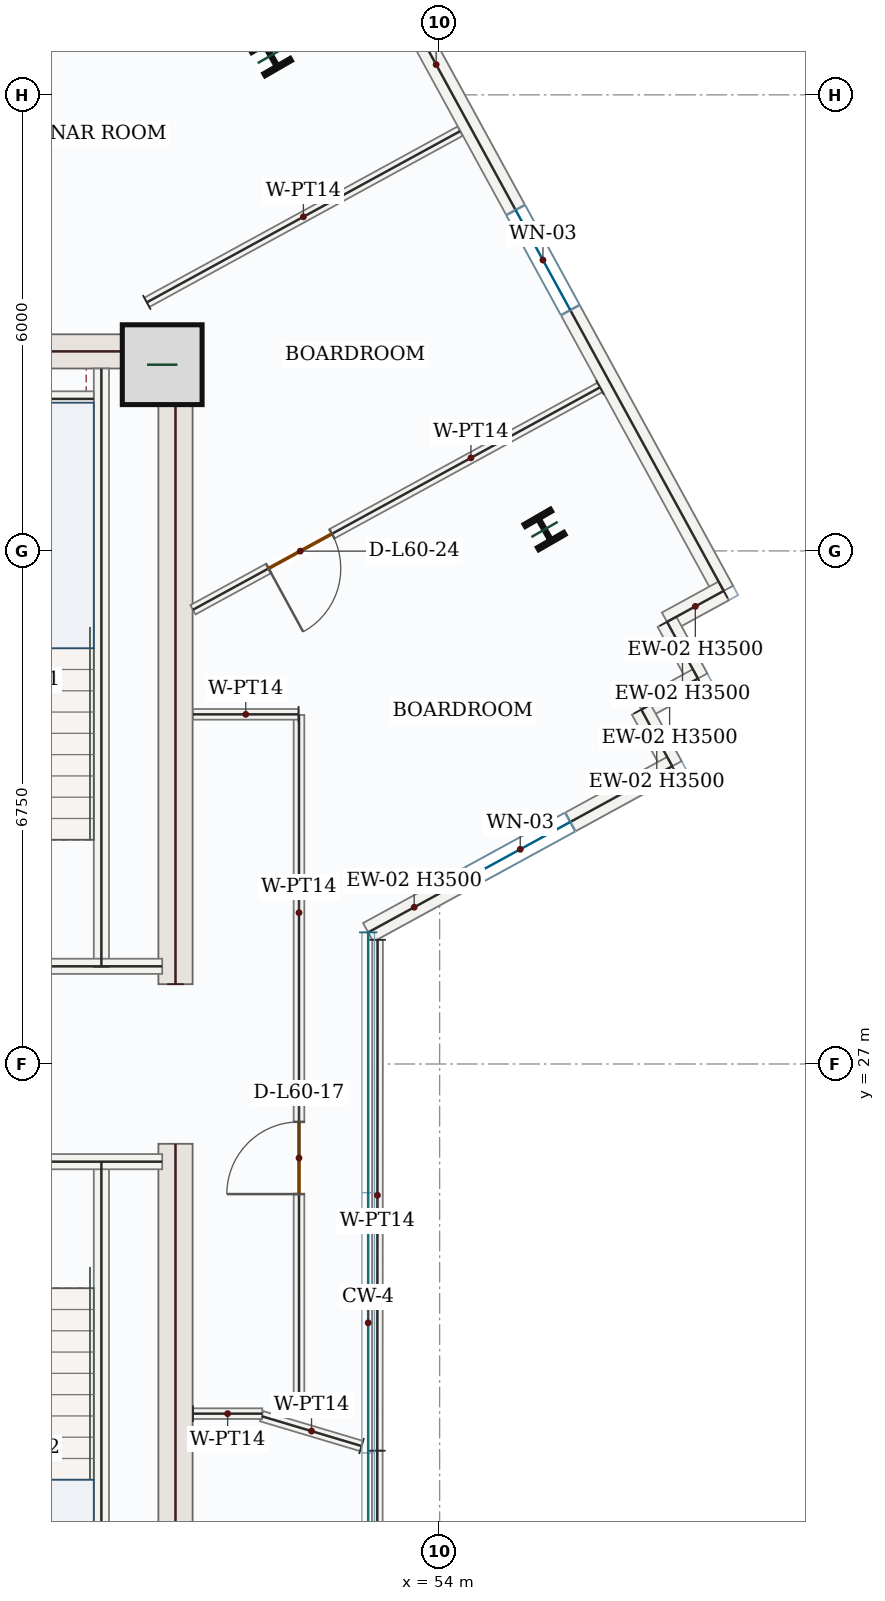
"""IFC4 building model, lengths in metres.
Left out: names, types, materials, properties, quantities, classifications, styles, units other than length and angle.
Written with IfcOpenShell. Run it as: python <this file> out.ifc"""

import sys

from ifc_helpers import new_model, si_unit, direction, frame, frame_2d, origin, origin_2d, place, context, subcontext, project, spatial, rectangle, i_section, extrude, source, transform, mapped, element, fill, save


model = new_model("IFC4")
c1 = context("Model", 3, precision=1e-05, world=origin(), true_north=direction((0.0, 1.0)))
c2 = subcontext(c1, "Body", "Model", "MODEL_VIEW")
j1 = project(units=[si_unit("LENGTHUNIT", "METRE"), si_unit("PLANEANGLEUNIT", "RADIAN")], contexts=[c1])
p1 = place(None, origin())
s1 = spatial("IfcSite", under=j1, at=p1, CompositionType="ELEMENT")
p2 = place(p1, origin())
s2 = spatial("IfcBuilding", under=s1, at=p2, CompositionType="ELEMENT")
p3 = place(p2, frame((0.0, 0.0, 254.1)))
s3 = spatial("IfcBuildingStorey", under=s2, at=p3, CompositionType="ELEMENT", Elevation=254.1)
m1 = source(origin(), c2, "Body", "SweptSolid", [
    extrude(rectangle(XDim=8.55, YDim=0.45, at=frame_2d((4.275, 0.0))), origin(), (0.0, 0.0, 1.0), 3.5),
])
for number, where, z_axis, x_axis in (
    (1, (50.525, 17.4, 0.0), (0.0, 0.0, 1.0), (0.0, 1.0, 0.0)),
    (2, (50.525, 28.05, 0.0), (0.0, 0.0, 1.0), (0.0, 1.0, 0.0)),
):
    element("IfcWall", number, at=place(p3, frame(where, z_axis=z_axis, x_axis=x_axis)), inside=s3, PredefinedType="SHEAR", context=c2, shape_type="MappedRepresentation", body=[
        mapped(m1, transform((0.0, 0.0, 0.0), x_axis=(1.0, 0.0, 0.0), y_axis=(0.0, 1.0, 0.0), z_axis=(0.0, 0.0, 1.0), scale=1.0)),
    ])
m2 = source(origin(), c2, "Body", "SweptSolid", [
    extrude(rectangle(XDim=7.1, YDim=0.45, at=frame_2d((3.55, 0.0))), origin(), (0.0, 0.0, 1.0), 3.5),
])
p4 = place(p3, frame((43.2, 36.375, 0.0), z_axis=(0.0, 0.0, 1.0), x_axis=(1.0, 0.0, 0.0)))
e3 = element("IfcWall", 3, at=p4, inside=s3, PredefinedType="SHEAR", context=c2, shape_type="MappedRepresentation", body=[
    mapped(m2, transform((0.0, 0.0, 0.0), x_axis=(1.0, 0.0, 0.0), y_axis=(0.0, 1.0, 0.0), z_axis=(0.0, 0.0, 1.0), scale=1.0)),
])
m3 = source(origin(), c2, "Body", "SweptSolid", [
    extrude(rectangle(XDim=1.05, YDim=1.05, at=origin_2d()), origin(), (0.0, 0.0, 1.0), 3.75),
])
p5 = place(p3, frame((50.35, 36.2, 0.0), z_axis=(0.0, 0.0, 1.0), x_axis=(1.0, 0.0, 0.0)))
e4 = element("IfcColumn", 4, at=p5, inside=s3, PredefinedType="COLUMN", context=c2, shape_type="MappedRepresentation", body=[
    mapped(m3, transform((0.0, 0.0, 0.0), x_axis=(1.0, 0.0, 0.0), y_axis=(0.0, 1.0, 0.0), z_axis=(0.0, 0.0, 1.0), scale=1.0)),
])
m4 = source(origin(), c2, "Body", "SweptSolid", [
    extrude(i_section(OverallWidth=0.399, OverallDepth=0.386, WebThickness=0.021, FlangeThickness=0.033, FilletRadius=0.018, at=origin_2d()), origin(), (0.0, 0.0, 1.0), 3.75),
])
for number, where, z_axis, x_axis in (
    (5, (55.38, 34.032, 0.0), (0.0, 0.0, 1.0), (0.866, 0.5, 0.0)),
    (6, (51.78, 40.268, 0.0), (0.0, 0.0, 1.0), (0.866, 0.5, 0.0)),
):
    element("IfcColumn", number, at=place(p3, frame(where, z_axis=z_axis, x_axis=x_axis)), inside=s3, PredefinedType="COLUMN", context=c2, shape_type="MappedRepresentation", body=[
        mapped(m4, transform((0.0, 0.0, 0.0), x_axis=(1.0, 0.0, 0.0), y_axis=(0.0, 1.0, 0.0), z_axis=(0.0, 0.0, 1.0), scale=1.0)),
    ])
p6 = place(p3, frame((44.549, 39.26, 0.0), z_axis=(0.0, 0.0, 1.0), x_axis=(0.877569176667, 0.479450039279, 0.0)))
e7 = element("IfcWall", 7, at=p6, inside=s3, PredefinedType="SOLIDWALL", context=c2, shape_type="SweptSolid", body=[
    extrude(rectangle(XDim=6.979, YDim=0.28, at=frame_2d((3.49, 0.0))), origin(), (0.0, 0.0, 1.0), 3.5),
])
p7 = place(p6, frame((2.74, 0.0, 0.85)))
e8 = element("IfcOpeningElement", 8, at=p7, cuts=e7, PredefinedType="OPENING", context=c2, shape_type="SweptSolid", body=[
    extrude(rectangle(XDim=1.5, YDim=1.5, at=frame_2d((0.75, 0.75))), frame((0.0, 0.15, 0.0), z_axis=(0.0, -1.0, 0.0), x_axis=(1.0, 0.0, 0.0)), (0.0, 0.0, 1.0), 0.3),
])
p8 = place(p3, frame((52.981, 41.929, 0.0), z_axis=(0.0, 0.0, 1.0), x_axis=(0.479472774144, -0.877556755347, 0.0)))
e9 = element("IfcWall", 9, at=p8, inside=s3, PredefinedType="SOLIDWALL", context=c2, shape_type="SweptSolid", body=[
    extrude(rectangle(XDim=9.92, YDim=0.28, at=frame_2d((4.96, 0.0))), origin(), (0.0, 0.0, 1.0), 3.5),
])
p9 = place(p8, frame((4.21, 0.0, 0.85)))
e10 = element("IfcOpeningElement", 10, at=p9, cuts=e9, PredefinedType="OPENING", context=c2, shape_type="SweptSolid", body=[
    extrude(rectangle(XDim=1.5, YDim=1.5, at=frame_2d((0.75, 0.75))), frame((0.0, 0.15, 0.0), z_axis=(0.0, -1.0, 0.0), x_axis=(1.0, 0.0, 0.0)), (0.0, 0.0, 1.0), 0.3),
])
m5 = source(origin(), c2, "Body", "SweptSolid", [
    extrude(rectangle(XDim=0.85, YDim=0.28, at=frame_2d((0.425, 0.0))), origin(), (0.0, 0.0, 1.0), 3.5),
])
p10 = place(p3, frame((57.737, 33.224, 0.0), z_axis=(0.0, 0.0, 1.0), x_axis=(-0.87752219781, -0.479536017782, 0.0)))
e11 = element("IfcWall", 11, at=p10, inside=s3, PredefinedType="SOLIDWALL", context=c2, shape_type="MappedRepresentation", body=[
    mapped(m5, transform((0.0, 0.0, 0.0), x_axis=(1.0, 0.0, 0.0), y_axis=(0.0, 1.0, 0.0), z_axis=(0.0, 0.0, 1.0), scale=1.0)),
])
m6 = source(origin(), c2, "Body", "SweptSolid", [
    extrude(rectangle(XDim=0.85, YDim=0.28, at=frame_2d((0.425, 0.0))), origin(), (0.0, 0.0, 1.0), 3.5),
])
for number, where, z_axis, x_axis in (
    (12, (56.991, 32.816, 0.0), (0.0, 0.0, 1.0), (0.479, -0.878, 0.0)),
    (13, (57.399, 32.071, 0.0), (0.0, 0.0, 1.0), (-0.878, -0.479, 0.0)),
):
    element("IfcWall", number, at=place(p3, frame(where, z_axis=z_axis, x_axis=x_axis)), inside=s3, PredefinedType="SOLIDWALL", context=c2, shape_type="MappedRepresentation", body=[
        mapped(m6, transform((0.0, 0.0, 0.0), x_axis=(1.0, 0.0, 0.0), y_axis=(0.0, 1.0, 0.0), z_axis=(0.0, 0.0, 1.0), scale=1.0)),
    ])
m7 = source(origin(), c2, "Body", "SweptSolid", [
    extrude(rectangle(XDim=0.85, YDim=0.28, at=frame_2d((0.425, 0.0))), origin(), (0.0, 0.0, 1.0), 3.5),
])
p11 = place(p3, frame((56.653, 31.663, 0.0), z_axis=(0.0, 0.0, 1.0), x_axis=(0.479314855696, -0.877643019177, 0.0)))
e14 = element("IfcWall", 14, at=p11, inside=s3, PredefinedType="SOLIDWALL", context=c2, shape_type="MappedRepresentation", body=[
    mapped(m7, transform((0.0, 0.0, 0.0), x_axis=(1.0, 0.0, 0.0), y_axis=(0.0, 1.0, 0.0), z_axis=(0.0, 0.0, 1.0), scale=1.0)),
])
p12 = place(p3, frame((57.06, 30.917, 0.0), z_axis=(0.0, 0.0, 1.0), x_axis=(-0.877563774399, -0.479459927276, 0.0)))
e15 = element("IfcWall", 15, at=p12, inside=s3, PredefinedType="SOLIDWALL", context=c2, shape_type="SweptSolid", body=[
    extrude(rectangle(XDim=4.558, YDim=0.28, at=frame_2d((2.279, 0.0))), origin(), (0.0, 0.0, 1.0), 3.5),
])
p13 = place(p12, frame((1.529, 0.0, 0.85)))
e16 = element("IfcOpeningElement", 16, at=p13, cuts=e15, PredefinedType="OPENING", context=c2, shape_type="SweptSolid", body=[
    extrude(rectangle(XDim=1.5, YDim=1.5, at=frame_2d((0.75, 0.75))), frame((0.0, 0.15, 0.0), z_axis=(0.0, -1.0, 0.0), x_axis=(1.0, 0.0, 0.0)), (0.0, 0.0, 1.0), 0.3),
])
m8 = source(origin(), c2, "Body", "SweptSolid", [
    extrude(rectangle(XDim=7.87, YDim=0.2, at=frame_2d((3.935, 0.0))), origin(), (0.0, 0.0, 1.0), 3.5),
])
for number, where, z_axis, x_axis in (
    (17, (49.55, 17.85, 0.0), (0.0, 0.0, 1.0), (0.0, 1.0, 0.0)),
    (18, (49.55, 28.28, 0.0), (0.0, 0.0, 1.0), (0.0, 1.0, 0.0)),
):
    element("IfcWall", number, at=place(p3, frame(where, z_axis=z_axis, x_axis=x_axis)), inside=s3, PredefinedType="SOLIDWALL", context=c2, shape_type="MappedRepresentation", body=[
        mapped(m8, transform((0.0, 0.0, 0.0), x_axis=(1.0, 0.0, 0.0), y_axis=(0.0, 1.0, 0.0), z_axis=(0.0, 0.0, 1.0), scale=1.0)),
    ])
m9 = source(origin(), c2, "Body", "SweptSolid", [
    extrude(rectangle(XDim=4.25, YDim=0.2, at=frame_2d((2.125, 0.0))), origin(), (0.0, 0.0, 1.0), 3.5),
])
for number, where, z_axis, x_axis in (
    (19, (46.1, 25.715, 0.0), (0.0, 0.0, 1.0), (1.0, 0.0, 0.0)),
    (20, (46.1, 28.285, 0.0), (0.0, 0.0, 1.0), (1.0, 0.0, 0.0)),
):
    element("IfcWall", number, at=place(p3, frame(where, z_axis=z_axis, x_axis=x_axis)), inside=s3, PredefinedType="SOLIDWALL", context=c2, shape_type="MappedRepresentation", body=[
        mapped(m9, transform((0.0, 0.0, 0.0), x_axis=(1.0, 0.0, 0.0), y_axis=(0.0, 1.0, 0.0), z_axis=(0.0, 0.0, 1.0), scale=1.0)),
    ])
m10 = source(origin(), c2, "Body", "SweptSolid", [
    extrude(rectangle(XDim=3.25, YDim=0.2, at=frame_2d((1.625, 0.0))), origin(), (0.0, 0.0, 1.0), 3.5),
])
p14 = place(p3, frame((46.2, 35.75, 0.0), z_axis=(0.0, 0.0, 1.0), x_axis=(1.0, 0.0, 0.0)))
e21 = element("IfcWall", 21, at=p14, inside=s3, PredefinedType="SOLIDWALL", context=c2, shape_type="MappedRepresentation", body=[
    mapped(m10, transform((0.0, 0.0, 0.0), x_axis=(1.0, 0.0, 0.0), y_axis=(0.0, 1.0, 0.0), z_axis=(0.0, 0.0, 1.0), scale=1.0)),
])
m11 = source(origin(), c2, "Body", "SweptSolid", [
    extrude(rectangle(XDim=4.695, YDim=0.14, at=frame_2d((2.348, 0.0))), origin(), (0.0, 0.0, 1.0), 3.5),
])
p15 = place(p3, frame((50.148, 37.02, 0.0), z_axis=(0.0, 0.0, 1.0), x_axis=(0.877559526902, 0.479467701461, 0.0)))
e22 = element("IfcWall", 22, at=p15, inside=s3, PredefinedType="PARTITIONING", context=c2, shape_type="MappedRepresentation", body=[
    mapped(m11, transform((0.0, 0.0, 0.0), x_axis=(1.0, 0.0, 0.0), y_axis=(0.0, 1.0, 0.0), z_axis=(0.0, 0.0, 1.0), scale=1.0)),
])
p16 = place(p3, frame((56.109, 35.901, 0.0), z_axis=(0.0, 0.0, 1.0), x_axis=(-0.877574248726, -0.479440755436, 0.0)))
e23 = element("IfcWall", 23, at=p16, inside=s3, PredefinedType="PARTITIONING", context=c2, shape_type="SweptSolid", body=[
    extrude(rectangle(XDim=6.102, YDim=0.14, at=frame_2d((3.051, 0.0))), origin(), (0.0, 0.0, 1.0), 3.5),
])
p17 = place(p16, frame((4.018, 0.0, 0.0)))
e24 = element("IfcOpeningElement", 24, at=p17, cuts=e23, PredefinedType="OPENING", context=c2, shape_type="SweptSolid", body=[
    extrude(rectangle(XDim=0.95, YDim=2.15, at=frame_2d((0.475, 1.075))), frame((0.0, 0.08, 0.0), z_axis=(0.0, -1.0, 0.0), x_axis=(1.0, 0.0, 0.0)), (0.0, 0.0, 1.0), 0.16),
])
p18 = place(p3, frame((52.15, 22.406, 0.0), z_axis=(0.0, 0.0, 1.0), x_axis=(-2.657666e-05, 0.999999999647, 0.0)))
e25 = element("IfcWall", 25, at=p18, inside=s3, PredefinedType="PARTITIONING", context=c2, shape_type="SweptSolid", body=[
    extrude(rectangle(XDim=9.186, YDim=0.14, at=frame_2d((4.593, 0.0))), origin(), (0.0, 0.0, 1.0), 3.5),
])
p19 = place(p18, frame((2.883, 0.0, 0.0)))
e26 = element("IfcOpeningElement", 26, at=p19, cuts=e25, PredefinedType="OPENING", context=c2, shape_type="SweptSolid", body=[
    extrude(rectangle(XDim=0.95, YDim=2.15, at=frame_2d((0.475, 1.075))), frame((0.0, 0.08, 0.0), z_axis=(0.0, -1.0, 0.0), x_axis=(1.0, 0.0, 0.0)), (0.0, 0.0, 1.0), 0.16),
])
m12 = source(origin(), c2, "Body", "SweptSolid", [
    extrude(rectangle(XDim=1.389, YDim=0.14, at=frame_2d((0.695, 0.0))), origin(), (0.0, 0.0, 1.0), 3.5),
])
p20 = place(p3, frame((52.144, 31.6, 0.0), z_axis=(0.0, 0.0, 1.0), x_axis=(-1.0, 0.0, 0.0)))
e27 = element("IfcWall", 27, at=p20, inside=s3, PredefinedType="PARTITIONING", context=c2, shape_type="MappedRepresentation", body=[
    mapped(m12, transform((0.0, 0.0, 0.0), x_axis=(1.0, 0.0, 0.0), y_axis=(0.0, 1.0, 0.0), z_axis=(0.0, 0.0, 1.0), scale=1.0)),
])
m13 = source(origin(), c2, "Body", "SweptSolid", [
    extrude(rectangle(XDim=6.722, YDim=0.14, at=frame_2d((3.361, 0.0))), origin(), (0.0, 0.0, 1.0), 3.5),
])
p21 = place(p3, frame((53.184, 28.634, 0.0), z_axis=(0.0, 0.0, 1.0), x_axis=(-0.000544820492, -0.999999851585, 0.0)))
e28 = element("IfcWall", 28, at=p21, inside=s3, PredefinedType="PARTITIONING", context=c2, shape_type="MappedRepresentation", body=[
    mapped(m13, transform((0.0, 0.0, 0.0), x_axis=(1.0, 0.0, 0.0), y_axis=(0.0, 1.0, 0.0), z_axis=(0.0, 0.0, 1.0), scale=1.0)),
])
m14 = source(origin(), c2, "Body", "SweptSolid", [
    extrude(rectangle(XDim=1.373, YDim=0.14, at=frame_2d((0.687, 0.0))), origin(), (0.0, 0.0, 1.0), 3.5),
])
p22 = place(p3, frame((52.972, 21.974, 0.0), z_axis=(0.0, 0.0, 1.0), x_axis=(-0.958236472503, 0.285977031883, 0.0)))
e29 = element("IfcWall", 29, at=p22, inside=s3, PredefinedType="PARTITIONING", context=c2, shape_type="MappedRepresentation", body=[
    mapped(m14, transform((0.0, 0.0, 0.0), x_axis=(1.0, 0.0, 0.0), y_axis=(0.0, 1.0, 0.0), z_axis=(0.0, 0.0, 1.0), scale=1.0)),
])
m15 = source(origin(), c2, "Body", "SweptSolid", [
    extrude(rectangle(XDim=0.912, YDim=0.14, at=frame_2d((0.456, 0.0))), origin(), (0.0, 0.0, 1.0), 3.5),
])
p23 = place(p3, frame((50.755, 22.4, 0.0), z_axis=(0.0, 0.0, 1.0), x_axis=(1.0, 0.0, 0.0)))
e30 = element("IfcWall", 30, at=p23, inside=s3, PredefinedType="PARTITIONING", context=c2, shape_type="MappedRepresentation", body=[
    mapped(m15, transform((0.0, 0.0, 0.0), x_axis=(1.0, 0.0, 0.0), y_axis=(0.0, 1.0, 0.0), z_axis=(0.0, 0.0, 1.0), scale=1.0)),
])
m16 = source(origin(), c2, "Body", "SweptSolid", [
    extrude(rectangle(XDim=3.504, YDim=0.14, at=frame_2d((1.752, 0.0))), origin(), (0.0, 0.0, 1.0), 3.5),
])
p24 = place(p3, frame((53.18, 21.912, 0.0), z_axis=(0.0, 0.0, 1.0), x_axis=(0.0, -1.0, 0.0)))
e31 = element("IfcWall", 31, at=p24, inside=s3, PredefinedType="PARTITIONING", context=c2, shape_type="MappedRepresentation", body=[
    mapped(m16, transform((0.0, 0.0, 0.0), x_axis=(1.0, 0.0, 0.0), y_axis=(0.0, 1.0, 0.0), z_axis=(0.0, 0.0, 1.0), scale=1.0)),
])
m17 = source(origin(), c2, "Body", "SweptSolid", [
    extrude(rectangle(XDim=1.5, YDim=1.5, at=frame_2d((0.75, 0.75))), frame((0.0, 0.03, 0.0), z_axis=(0.0, -1.0, 0.0), x_axis=(1.0, 0.0, 0.0)), (0.0, 0.0, 1.0), 0.06),
])
p25 = place(p9, origin())
e32 = element("IfcWindow", 32, at=p25, inside=s3, PartitioningType="SINGLE_PANEL", PredefinedType="WINDOW", context=c2, shape_type="MappedRepresentation", body=[
    mapped(m17, transform((0.0, 0.0, 0.0), x_axis=(1.0, 0.0, 0.0), y_axis=(0.0, 1.0, 0.0), z_axis=(0.0, 0.0, 1.0), scale=1.0)),
])
fill(e10, e32)
p26 = place(p13, origin())
e33 = element("IfcWindow", 33, at=p26, inside=s3, PartitioningType="SINGLE_PANEL", PredefinedType="WINDOW", context=c2, shape_type="MappedRepresentation", body=[
    mapped(m17, transform((0.0, 0.0, 0.0), x_axis=(1.0, 0.0, 0.0), y_axis=(0.0, 1.0, 0.0), z_axis=(0.0, 0.0, 1.0), scale=1.0)),
])
fill(e16, e33)
m18 = source(origin(), c2, "Body", "SweptSolid", [
    extrude(rectangle(XDim=0.95, YDim=2.15, at=frame_2d((0.475, 1.075))), frame((0.0, 0.025, 0.0), z_axis=(0.0, -1.0, 0.0), x_axis=(1.0, 0.0, 0.0)), (0.0, 0.0, 1.0), 0.05),
])
p27 = place(p19, origin())
e34 = element("IfcDoor", 34, at=p27, inside=s3, OperationType="SINGLE_SWING_LEFT", PredefinedType="DOOR", context=c2, shape_type="MappedRepresentation", body=[
    mapped(m18, transform((0.0, 0.0, 0.0), x_axis=(1.0, 0.0, 0.0), y_axis=(0.0, 1.0, 0.0), z_axis=(0.0, 0.0, 1.0), scale=1.0)),
])
fill(e26, e34)
p28 = place(p17, origin())
e35 = element("IfcDoor", 35, at=p28, inside=s3, OperationType="SINGLE_SWING_RIGHT", PredefinedType="DOOR", context=c2, shape_type="MappedRepresentation", body=[
    mapped(m18, transform((0.0, 0.0, 0.0), x_axis=(1.0, 0.0, 0.0), y_axis=(0.0, 1.0, 0.0), z_axis=(0.0, 0.0, 1.0), scale=1.0)),
])
fill(e24, e35)
save(model, sys.argv[1])
